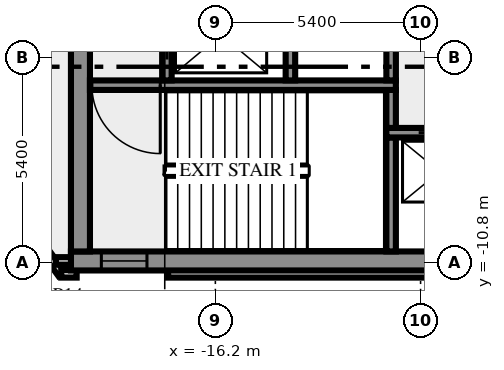
"""IFC4 building model, lengths in metres.
Left out: names, types, materials, properties, quantities, classifications, styles, units other than length and angle.
Written with IfcOpenShell. Run it as: python <this file> out.ifc"""

import sys

from ifc_helpers import new_model, si_unit, direction, frame, frame_2d, origin, place, context, subcontext, project, spatial, rectangle, extrude, element, fill, save


model = new_model("IFC4")
c1 = context("Model", 3, precision=1e-05, world=origin(), true_north=direction((0.0, 1.0)))
c2 = subcontext(c1, "Body", "Model", "MODEL_VIEW")
j1 = project(units=[si_unit("LENGTHUNIT", "METRE"), si_unit("PLANEANGLEUNIT", "RADIAN")], contexts=[c1])
p1 = place(None, origin())
s1 = spatial("IfcSite", under=j1, at=p1, CompositionType="ELEMENT")
p2 = place(p1, origin())
s2 = spatial("IfcBuilding", under=s1, at=p2, CompositionType="ELEMENT")
p3 = place(p2, frame((0.0, 0.0, 59.0)))
s3 = spatial("IfcBuildingStorey", under=s2, at=p3, CompositionType="ELEMENT", Elevation=59.0)
p4 = place(p3, frame((-21.833, -8.909, 0.0), z_axis=(0.0, 0.0, 1.0), x_axis=(0.587766567315, -0.809030569476, 0.0)))
e1 = element("IfcWall", 1, at=p4, inside=s3, PredefinedType="SOLIDWALL", context=c2, shape_type="SweptSolid", body=[
    extrude(rectangle(XDim=2.688, YDim=0.2, at=frame_2d((1.344, 0.0))), origin(), (0.0, 0.0, 1.0), 3.65),
])
p5 = place(p3, frame((-20.256, -11.088, 0.0), z_axis=(0.0, 0.0, 1.0), x_axis=(1.0, 0.0, 0.0)))
e2 = element("IfcWall", 2, at=p5, inside=s3, PredefinedType="SOLIDWALL", context=c2, shape_type="SweptSolid", body=[
    extrude(rectangle(XDim=0.406, YDim=0.2, at=frame_2d((0.203, 0.0))), origin(), (0.0, 0.0, 1.0), 3.65),
])
p6 = place(p3, frame((-17.444, -11.088, 0.0), z_axis=(0.0, 0.0, 1.0), x_axis=(1.0, 0.0, 0.0)))
e3 = element("IfcWall", 3, at=p6, inside=s3, PredefinedType="SOLIDWALL", context=c2, shape_type="SweptSolid", body=[
    extrude(rectangle(XDim=34.888, YDim=0.2, at=frame_2d((17.444, 0.0))), origin(), (0.0, 0.0, 1.0), 3.65),
])
p7 = place(p3, frame((-19.98, -10.75, 0.0), z_axis=(0.0, 0.0, 1.0), x_axis=(-1.0, 0.0, 0.0)))
e4 = element("IfcWall", 4, at=p7, inside=s3, PredefinedType="SOLIDWALL", context=c2, shape_type="SweptSolid", body=[
    extrude(rectangle(XDim=0.417, YDim=0.2, at=frame_2d((0.208, 0.0))), origin(), (0.0, 0.0, 1.0), 3.65),
])
p8 = place(p3, frame((-20.0, -10.75, 0.0), z_axis=(0.0, 0.0, 1.0), x_axis=(1.0, 0.0, 0.0)))
e5 = element("IfcWall", 5, at=p8, inside=s3, PredefinedType="SHEAR", context=c2, shape_type="SweptSolid", body=[
    extrude(rectangle(XDim=40.0, YDim=0.5, at=frame_2d((20.0, 0.0))), origin(), (0.0, 0.0, 1.0), 3.65),
])
p9 = place(p8, frame((0.8, 0.0, 1.0)))
e6 = element("IfcOpeningElement", 6, at=p9, cuts=e5, PredefinedType="OPENING", context=c2, shape_type="SweptSolid", body=[
    extrude(rectangle(XDim=1.2, YDim=1.2, at=frame_2d((0.6, 0.6))), frame((0.0, 0.26, 0.0), z_axis=(0.0, -1.0, 0.0), x_axis=(1.0, 0.0, 0.0)), (0.0, 0.0, 1.0), 0.52),
])
p10 = place(p8, frame((38.0, 0.0, 1.0)))
e7 = element("IfcOpeningElement", 7, at=p10, cuts=e5, PredefinedType="OPENING", context=c2, shape_type="SweptSolid", body=[
    extrude(rectangle(XDim=1.2, YDim=1.2, at=frame_2d((0.6, 0.6))), frame((0.0, 0.26, 0.0), z_axis=(0.0, -1.0, 0.0), x_axis=(1.0, 0.0, 0.0)), (0.0, 0.0, 1.0), 0.52),
])
p11 = place(p3, frame((-19.75, -10.5, 0.0), z_axis=(0.0, 0.0, 1.0), x_axis=(0.0, 1.0, 0.0)))
e8 = element("IfcWall", 8, at=p11, inside=s3, PredefinedType="SHEAR", context=c2, shape_type="SweptSolid", body=[
    extrude(rectangle(XDim=8.8, YDim=0.5, at=frame_2d((4.4, 0.0))), origin(), (0.0, 0.0, 1.0), 3.65),
])
p12 = place(p3, frame((-11.575, -10.5, 0.0), z_axis=(0.0, 0.0, 1.0), x_axis=(0.0, 1.0, 0.0)))
e9 = element("IfcWall", 9, at=p12, inside=s3, PredefinedType="SHEAR", context=c2, shape_type="SweptSolid", body=[
    extrude(rectangle(XDim=3.0, YDim=0.25, at=frame_2d((1.5, 0.0))), origin(), (0.0, 0.0, 1.0), 3.65),
])
p13 = place(p3, frame((11.7, -7.375, 0.0), z_axis=(0.0, 0.0, 1.0), x_axis=(-1.0, 0.0, 0.0)))
e10 = element("IfcWall", 10, at=p13, inside=s3, PredefinedType="SHEAR", context=c2, shape_type="SweptSolid", body=[
    extrude(rectangle(XDim=23.4, YDim=0.25, at=frame_2d((11.7, 0.0))), origin(), (0.0, 0.0, 1.0), 3.65),
])
p14 = place(p13, frame((21.45, 0.0, 0.0)))
e11 = element("IfcOpeningElement", 11, at=p14, cuts=e10, PredefinedType="OPENING", context=c2, shape_type="SweptSolid", body=[
    extrude(rectangle(XDim=1.1, YDim=2.1, at=frame_2d((0.55, 1.05))), frame((0.0, 0.135, 0.0), z_axis=(0.0, -1.0, 0.0), x_axis=(1.0, 0.0, 0.0)), (0.0, 0.0, 1.0), 0.27),
])
p15 = place(p13, frame((18.95, 0.0, 0.0)))
e12 = element("IfcOpeningElement", 12, at=p15, cuts=e10, PredefinedType="OPENING", context=c2, shape_type="SweptSolid", body=[
    extrude(rectangle(XDim=1.1, YDim=2.1, at=frame_2d((0.55, 1.05))), frame((0.0, 0.135, 0.0), z_axis=(0.0, -1.0, 0.0), x_axis=(1.0, 0.0, 0.0)), (0.0, 0.0, 1.0), 0.27),
])
p16 = place(p13, frame((16.45, 0.0, 0.0)))
e13 = element("IfcOpeningElement", 13, at=p16, cuts=e10, PredefinedType="OPENING", context=c2, shape_type="SweptSolid", body=[
    extrude(rectangle(XDim=1.1, YDim=2.1, at=frame_2d((0.55, 1.05))), frame((0.0, 0.135, 0.0), z_axis=(0.0, -1.0, 0.0), x_axis=(1.0, 0.0, 0.0)), (0.0, 0.0, 1.0), 0.27),
])
p17 = place(p13, frame((14.5, 0.0, 0.0)))
e14 = element("IfcOpeningElement", 14, at=p17, cuts=e10, PredefinedType="OPENING", context=c2, shape_type="SweptSolid", body=[
    extrude(rectangle(XDim=0.9, YDim=2.1, at=frame_2d((0.45, 1.05))), frame((0.0, 0.135, 0.0), z_axis=(0.0, -1.0, 0.0), x_axis=(1.0, 0.0, 0.0)), (0.0, 0.0, 1.0), 0.27),
])
p18 = place(p13, frame((12.95, 0.0, 0.0)))
e15 = element("IfcOpeningElement", 15, at=p18, cuts=e10, PredefinedType="OPENING", context=c2, shape_type="SweptSolid", body=[
    extrude(rectangle(XDim=0.9, YDim=2.1, at=frame_2d((0.45, 1.05))), frame((0.0, 0.135, 0.0), z_axis=(0.0, -1.0, 0.0), x_axis=(1.0, 0.0, 0.0)), (0.0, 0.0, 1.0), 0.27),
])
p19 = place(p13, frame((11.475, 0.0, 0.0)))
e16 = element("IfcOpeningElement", 16, at=p19, cuts=e10, PredefinedType="OPENING", context=c2, shape_type="SweptSolid", body=[
    extrude(rectangle(XDim=0.9, YDim=2.1, at=frame_2d((0.45, 1.05))), frame((0.0, 0.135, 0.0), z_axis=(0.0, -1.0, 0.0), x_axis=(1.0, 0.0, 0.0)), (0.0, 0.0, 1.0), 0.27),
])
p20 = place(p13, frame((10.45, 0.0, 0.0)))
e17 = element("IfcOpeningElement", 17, at=p20, cuts=e10, PredefinedType="OPENING", context=c2, shape_type="SweptSolid", body=[
    extrude(rectangle(XDim=0.5, YDim=2.1, at=frame_2d((0.25, 1.05))), frame((0.0, 0.135, 0.0), z_axis=(0.0, -1.0, 0.0), x_axis=(1.0, 0.0, 0.0)), (0.0, 0.0, 1.0), 0.27),
])
p21 = place(p3, frame((-11.575, -7.25, 0.0), z_axis=(0.0, 0.0, 1.0), x_axis=(0.0, 1.0, 0.0)))
e18 = element("IfcWall", 18, at=p21, inside=s3, PredefinedType="SHEAR", context=c2, shape_type="SweptSolid", body=[
    extrude(rectangle(XDim=1.0, YDim=0.25, at=frame_2d((0.5, 0.0))), origin(), (0.0, 0.0, 1.0), 3.65),
])
p22 = place(p3, frame((-11.45, -6.125, 0.0), z_axis=(0.0, 0.0, 1.0), x_axis=(-1.0, 0.0, 0.0)))
e19 = element("IfcWall", 19, at=p22, inside=s3, PredefinedType="SHEAR", context=c2, shape_type="SweptSolid", body=[
    extrude(rectangle(XDim=8.05, YDim=0.25, at=frame_2d((4.025, 0.0))), origin(), (0.0, 0.0, 1.0), 3.65),
])
p23 = place(p22, frame((6.2, 0.0, 0.0)))
e20 = element("IfcOpeningElement", 20, at=p23, cuts=e19, PredefinedType="OPENING", context=c2, shape_type="SweptSolid", body=[
    extrude(rectangle(XDim=1.8, YDim=2.1, at=frame_2d((0.9, 1.05))), frame((0.0, 0.135, 0.0), z_axis=(0.0, -1.0, 0.0), x_axis=(1.0, 0.0, 0.0)), (0.0, 0.0, 1.0), 0.27),
])
p24 = place(p3, frame((-17.475, -6.0, 0.0), z_axis=(0.0, 0.0, 1.0), x_axis=(0.0, 1.0, 0.0)))
e21 = element("IfcWall", 21, at=p24, inside=s3, PredefinedType="SHEAR", context=c2, shape_type="SweptSolid", body=[
    extrude(rectangle(XDim=4.3, YDim=0.25, at=frame_2d((2.15, 0.0))), origin(), (0.0, 0.0, 1.0), 3.65),
])
p25 = place(p24, frame((0.55, 0.0, 0.0)))
e22 = element("IfcOpeningElement", 22, at=p25, cuts=e21, PredefinedType="OPENING", context=c2, shape_type="SweptSolid", body=[
    extrude(rectangle(XDim=1.3, YDim=2.1, at=frame_2d((0.65, 1.05))), frame((0.0, 0.135, 0.0), z_axis=(0.0, -1.0, 0.0), x_axis=(1.0, 0.0, 0.0)), (0.0, 0.0, 1.0), 0.27),
])
for number, where, z_axis, x_axis in (
    (23, (-14.225, -6.0, 0.0), (0.0, 0.0, 1.0), (0.0, 1.0, 0.0)),
    (24, (-11.575, -6.0, 0.0), (0.0, 0.0, 1.0), (0.0, 1.0, 0.0)),
):
    element("IfcWall", number, at=place(p3, frame(where, z_axis=z_axis, x_axis=x_axis)), inside=s3, PredefinedType="SHEAR", context=c2, shape_type="SweptSolid", body=[
        extrude(rectangle(XDim=1.75, YDim=0.25, at=frame_2d((0.875, 0.0))), origin(), (0.0, 0.0, 1.0), 3.65),
    ])
p26 = place(p9, origin())
e25 = element("IfcWindow", 25, at=p26, inside=s3, PartitioningType="SINGLE_PANEL", PredefinedType="WINDOW", context=c2, shape_type="SweptSolid", body=[
    extrude(rectangle(XDim=1.2, YDim=1.2, at=frame_2d((0.6, 0.6))), frame((0.0, 0.03, 0.0), z_axis=(0.0, -1.0, 0.0), x_axis=(1.0, 0.0, 0.0)), (0.0, 0.0, 1.0), 0.06),
])
fill(e6, e25)
p27 = place(p14, origin())
e26 = element("IfcDoor", 26, at=p27, inside=s3, OperationType="DOUBLE_DOOR_SLIDING", PredefinedType="DOOR", context=c2, shape_type="SweptSolid", body=[
    extrude(rectangle(XDim=1.1, YDim=2.1, at=frame_2d((0.55, 1.05))), frame((0.0, 0.025, 0.0), z_axis=(0.0, -1.0, 0.0), x_axis=(1.0, 0.0, 0.0)), (0.0, 0.0, 1.0), 0.05),
])
fill(e11, e26)
p28 = place(p23, origin())
e27 = element("IfcDoor", 27, at=p28, inside=s3, OperationType="DOUBLE_DOOR_SINGLE_SWING", PredefinedType="DOOR", context=c2, shape_type="SweptSolid", body=[
    extrude(rectangle(XDim=1.8, YDim=2.1, at=frame_2d((0.9, 1.05))), frame((0.0, 0.025, 0.0), z_axis=(0.0, -1.0, 0.0), x_axis=(1.0, 0.0, 0.0)), (0.0, 0.0, 1.0), 0.05),
])
fill(e20, e27)
p29 = place(p25, origin())
e28 = element("IfcDoor", 28, at=p29, inside=s3, OperationType="DOUBLE_DOOR_SLIDING", PredefinedType="DOOR", context=c2, shape_type="SweptSolid", body=[
    extrude(rectangle(XDim=1.3, YDim=2.1, at=frame_2d((0.65, 1.05))), frame((0.0, 0.025, 0.0), z_axis=(0.0, -1.0, 0.0), x_axis=(1.0, 0.0, 0.0)), (0.0, 0.0, 1.0), 0.05),
])
fill(e22, e28)
save(model, sys.argv[1])
